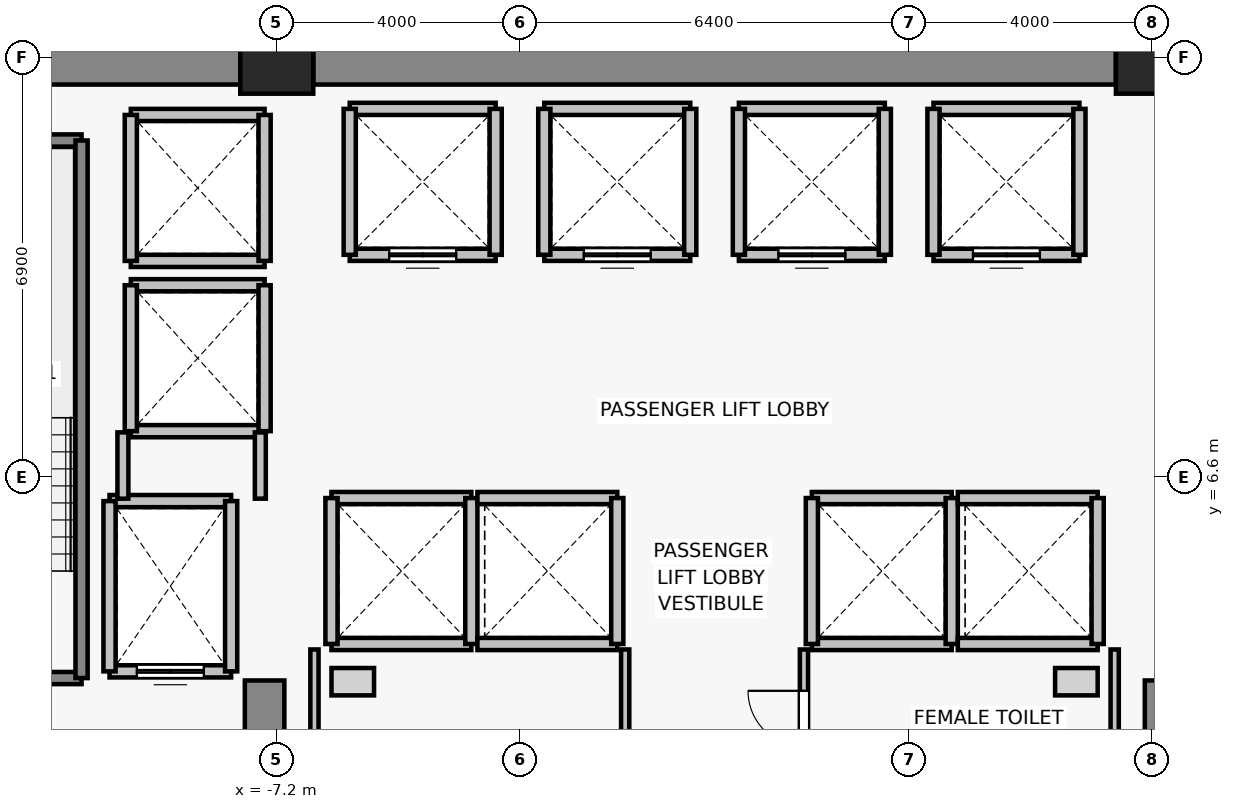
"""IFC4 building model, lengths in metres.
Left out: names, types, materials, properties, quantities, classifications, styles, units other than length and angle.
Written with IfcOpenShell. Run it as: python <this file> out.ifc"""

import sys

from ifc_helpers import new_model, si_unit, direction, frame, frame_2d, origin, origin_2d, place, context, subcontext, project, spatial, rectangle, extrude, source, transform, mapped, element, fill, save


model = new_model("IFC4")
c1 = context("Model", 3, precision=1e-05, world=origin(), true_north=direction((0.0, 1.0)))
c2 = subcontext(c1, "Body", "Model", "MODEL_VIEW")
j1 = project(units=[si_unit("LENGTHUNIT", "METRE"), si_unit("PLANEANGLEUNIT", "RADIAN")], contexts=[c1])
p1 = place(None, origin())
s1 = spatial("IfcSite", under=j1, at=p1, CompositionType="ELEMENT")
p2 = place(p1, origin())
s2 = spatial("IfcBuilding", under=s1, at=p2, CompositionType="ELEMENT")
p3 = place(p2, frame((0.0, 0.0, 40.6)))
s3 = spatial("IfcBuildingStorey", under=s2, at=p3, CompositionType="ELEMENT", Elevation=40.6)
for number, where, z_axis, x_axis in (
    (1, (-7.2, 13.5, 0.0), (0.0, 0.0, 1.0), (1.0, 0.0, 0.0)),
    (2, (7.2, 13.5, 0.0), (0.0, 0.0, 1.0), (1.0, 0.0, 0.0)),
):
    element("IfcColumn", number, at=place(p3, frame(where, z_axis=z_axis, x_axis=x_axis)), inside=s3, PredefinedType="COLUMN", context=c2, shape_type="SweptSolid", body=[
        extrude(rectangle(XDim=1.2, YDim=1.2, at=origin_2d()), origin(), (0.0, 0.0, 1.0), 3.3),
    ])
p4 = place(p3, frame((-13.8, 13.5, 0.0), z_axis=(0.0, 0.0, 1.0), x_axis=(1.0, 0.0, 0.0)))
e3 = element("IfcWall", 3, at=p4, inside=s3, PredefinedType="SHEAR", context=c2, shape_type="SweptSolid", body=[
    extrude(rectangle(XDim=6.0, YDim=0.9, at=frame_2d((3.0, 0.0))), origin(), (0.0, 0.0, 1.0), 3.075),
])
p5 = place(p3, frame((-6.6, 13.5, 0.0), z_axis=(0.0, 0.0, 1.0), x_axis=(1.0, 0.0, 0.0)))
e4 = element("IfcWall", 4, at=p5, inside=s3, PredefinedType="SHEAR", context=c2, shape_type="SweptSolid", body=[
    extrude(rectangle(XDim=13.2, YDim=0.9, at=frame_2d((6.6, 0.0))), origin(), (0.0, 0.0, 1.0), 3.075),
])
for number, where, z_axis, x_axis in (
    (5, (-7.4, -0.75, 0.0), (0.0, 0.0, 1.0), (0.0, 1.0, 0.0)),
    (6, (7.4, -0.75, 0.0), (0.0, 0.0, 1.0), (0.0, 1.0, 0.0)),
):
    element("IfcWall", number, at=place(p3, frame(where, z_axis=z_axis, x_axis=x_axis)), inside=s3, PredefinedType="SHEAR", context=c2, shape_type="SweptSolid", body=[
        extrude(rectangle(XDim=4.0, YDim=0.65, at=frame_2d((2.0, 0.0))), origin(), (0.0, 0.0, 1.0), 3.075),
    ])
p6 = place(p3, frame((-7.95, 3.4, 0.0), z_axis=(0.0, 0.0, 1.0), x_axis=(-1.0, 0.0, 0.0)))
e7 = element("IfcWall", 7, at=p6, inside=s3, PredefinedType="SOLIDWALL", context=c2, shape_type="SweptSolid", body=[
    extrude(rectangle(XDim=2.0, YDim=0.2, at=frame_2d((1.0, 0.0))), origin(), (0.0, 0.0, 1.0), 3.075),
])
p7 = place(p6, frame((0.45, 0.0, 0.0)))
e8 = element("IfcOpeningElement", 8, at=p7, cuts=e7, PredefinedType="OPENING", context=c2, shape_type="SweptSolid", body=[
    extrude(rectangle(XDim=1.1, YDim=2.2, at=frame_2d((0.55, 1.1))), frame((0.0, 0.11, 0.0), z_axis=(0.0, -1.0, 0.0), x_axis=(1.0, 0.0, 0.0)), (0.0, 0.0, 1.0), 0.22),
])
p8 = place(p3, frame((-9.95, 6.2, 0.0), z_axis=(0.0, 0.0, 1.0), x_axis=(1.0, 0.0, 0.0)))
e9 = element("IfcWall", 9, at=p8, inside=s3, PredefinedType="SOLIDWALL", context=c2, shape_type="SweptSolid", body=[
    extrude(rectangle(XDim=2.0, YDim=0.2, at=frame_2d((1.0, 0.0))), origin(), (0.0, 0.0, 1.0), 3.075),
])
for number, where, z_axis, x_axis in (
    (10, (-9.95, 3.4, 0.0), (0.0, 0.0, 1.0), (0.0, 1.0, 0.0)),
    (11, (-7.95, 6.2, 0.0), (0.0, 0.0, 1.0), (0.0, -1.0, 0.0)),
):
    element("IfcWall", number, at=place(p3, frame(where, z_axis=z_axis, x_axis=x_axis)), inside=s3, PredefinedType="SOLIDWALL", context=c2, shape_type="SweptSolid", body=[
        extrude(rectangle(XDim=2.8, YDim=0.2, at=frame_2d((1.4, 0.0))), origin(), (0.0, 0.0, 1.0), 3.075),
    ])
p9 = place(p3, frame((-3.6, 10.25, 0.0), z_axis=(0.0, 0.0, 1.0), x_axis=(-1.0, 0.0, 0.0)))
e12 = element("IfcWall", 12, at=p9, inside=s3, PredefinedType="SOLIDWALL", context=c2, shape_type="SweptSolid", body=[
    extrude(rectangle(XDim=2.4, YDim=0.2, at=frame_2d((1.2, 0.0))), origin(), (0.0, 0.0, 1.0), 3.075),
])
p10 = place(p9, frame((0.65, 0.0, 0.0)))
e13 = element("IfcOpeningElement", 13, at=p10, cuts=e12, PredefinedType="OPENING", context=c2, shape_type="SweptSolid", body=[
    extrude(rectangle(XDim=1.1, YDim=2.2, at=frame_2d((0.55, 1.1))), frame((0.0, 0.11, 0.0), z_axis=(0.0, -1.0, 0.0), x_axis=(1.0, 0.0, 0.0)), (0.0, 0.0, 1.0), 0.22),
])
for number, where, z_axis, x_axis in (
    (14, (-6.0, 12.65, 0.0), (0.0, 0.0, 1.0), (1.0, 0.0, 0.0)),
    (15, (-6.0, 10.25, 0.0), (0.0, 0.0, 1.0), (0.0, 1.0, 0.0)),
    (16, (-3.6, 12.65, 0.0), (0.0, 0.0, 1.0), (0.0, -1.0, 0.0)),
):
    element("IfcWall", number, at=place(p3, frame(where, z_axis=z_axis, x_axis=x_axis)), inside=s3, PredefinedType="SOLIDWALL", context=c2, shape_type="SweptSolid", body=[
        extrude(rectangle(XDim=2.4, YDim=0.2, at=frame_2d((1.2, 0.0))), origin(), (0.0, 0.0, 1.0), 3.075),
    ])
p11 = place(p3, frame((-0.4, 10.25, 0.0), z_axis=(0.0, 0.0, 1.0), x_axis=(-1.0, 0.0, 0.0)))
e17 = element("IfcWall", 17, at=p11, inside=s3, PredefinedType="SOLIDWALL", context=c2, shape_type="SweptSolid", body=[
    extrude(rectangle(XDim=2.4, YDim=0.2, at=frame_2d((1.2, 0.0))), origin(), (0.0, 0.0, 1.0), 3.075),
])
p12 = place(p11, frame((0.65, 0.0, 0.0)))
e18 = element("IfcOpeningElement", 18, at=p12, cuts=e17, PredefinedType="OPENING", context=c2, shape_type="SweptSolid", body=[
    extrude(rectangle(XDim=1.1, YDim=2.2, at=frame_2d((0.55, 1.1))), frame((0.0, 0.11, 0.0), z_axis=(0.0, -1.0, 0.0), x_axis=(1.0, 0.0, 0.0)), (0.0, 0.0, 1.0), 0.22),
])
p13 = place(p3, frame((-2.8, 12.65, 0.0), z_axis=(0.0, 0.0, 1.0), x_axis=(1.0, 0.0, 0.0)))
e19 = element("IfcWall", 19, at=p13, inside=s3, PredefinedType="SOLIDWALL", context=c2, shape_type="SweptSolid", body=[
    extrude(rectangle(XDim=2.4, YDim=0.2, at=frame_2d((1.2, 0.0))), origin(), (0.0, 0.0, 1.0), 3.075),
])
for number, where, z_axis, x_axis in (
    (20, (-2.8, 10.25, 0.0), (0.0, 0.0, 1.0), (0.0, 1.0, 0.0)),
    (21, (-0.4, 12.65, 0.0), (0.0, 0.0, 1.0), (0.0, -1.0, 0.0)),
):
    element("IfcWall", number, at=place(p3, frame(where, z_axis=z_axis, x_axis=x_axis)), inside=s3, PredefinedType="SOLIDWALL", context=c2, shape_type="SweptSolid", body=[
        extrude(rectangle(XDim=2.4, YDim=0.2, at=frame_2d((1.2, 0.0))), origin(), (0.0, 0.0, 1.0), 3.075),
    ])
p14 = place(p3, frame((2.8, 10.25, 0.0), z_axis=(0.0, 0.0, 1.0), x_axis=(-1.0, 0.0, 0.0)))
e22 = element("IfcWall", 22, at=p14, inside=s3, PredefinedType="SOLIDWALL", context=c2, shape_type="SweptSolid", body=[
    extrude(rectangle(XDim=2.4, YDim=0.2, at=frame_2d((1.2, 0.0))), origin(), (0.0, 0.0, 1.0), 3.075),
])
p15 = place(p14, frame((0.65, 0.0, 0.0)))
e23 = element("IfcOpeningElement", 23, at=p15, cuts=e22, PredefinedType="OPENING", context=c2, shape_type="SweptSolid", body=[
    extrude(rectangle(XDim=1.1, YDim=2.2, at=frame_2d((0.55, 1.1))), frame((0.0, 0.11, 0.0), z_axis=(0.0, -1.0, 0.0), x_axis=(1.0, 0.0, 0.0)), (0.0, 0.0, 1.0), 0.22),
])
p16 = place(p3, frame((0.4, 12.65, 0.0), z_axis=(0.0, 0.0, 1.0), x_axis=(1.0, 0.0, 0.0)))
e24 = element("IfcWall", 24, at=p16, inside=s3, PredefinedType="SOLIDWALL", context=c2, shape_type="SweptSolid", body=[
    extrude(rectangle(XDim=2.4, YDim=0.2, at=frame_2d((1.2, 0.0))), origin(), (0.0, 0.0, 1.0), 3.075),
])
for number, where, z_axis, x_axis in (
    (25, (0.4, 10.25, 0.0), (0.0, 0.0, 1.0), (0.0, 1.0, 0.0)),
    (26, (2.8, 12.65, 0.0), (0.0, 0.0, 1.0), (0.0, -1.0, 0.0)),
):
    element("IfcWall", number, at=place(p3, frame(where, z_axis=z_axis, x_axis=x_axis)), inside=s3, PredefinedType="SOLIDWALL", context=c2, shape_type="SweptSolid", body=[
        extrude(rectangle(XDim=2.4, YDim=0.2, at=frame_2d((1.2, 0.0))), origin(), (0.0, 0.0, 1.0), 3.075),
    ])
p17 = place(p3, frame((6.0, 10.25, 0.0), z_axis=(0.0, 0.0, 1.0), x_axis=(-1.0, 0.0, 0.0)))
e27 = element("IfcWall", 27, at=p17, inside=s3, PredefinedType="SOLIDWALL", context=c2, shape_type="SweptSolid", body=[
    extrude(rectangle(XDim=2.4, YDim=0.2, at=frame_2d((1.2, 0.0))), origin(), (0.0, 0.0, 1.0), 3.075),
])
p18 = place(p17, frame((0.65, 0.0, 0.0)))
e28 = element("IfcOpeningElement", 28, at=p18, cuts=e27, PredefinedType="OPENING", context=c2, shape_type="SweptSolid", body=[
    extrude(rectangle(XDim=1.1, YDim=2.2, at=frame_2d((0.55, 1.1))), frame((0.0, 0.11, 0.0), z_axis=(0.0, -1.0, 0.0), x_axis=(1.0, 0.0, 0.0)), (0.0, 0.0, 1.0), 0.22),
])
for number, where, z_axis, x_axis in (
    (29, (3.6, 12.65, 0.0), (0.0, 0.0, 1.0), (1.0, 0.0, 0.0)),
    (30, (3.6, 10.25, 0.0), (0.0, 0.0, 1.0), (0.0, 1.0, 0.0)),
    (31, (6.0, 12.65, 0.0), (0.0, 0.0, 1.0), (0.0, -1.0, 0.0)),
):
    element("IfcWall", number, at=place(p3, frame(where, z_axis=z_axis, x_axis=x_axis)), inside=s3, PredefinedType="SOLIDWALL", context=c2, shape_type="SweptSolid", body=[
        extrude(rectangle(XDim=2.4, YDim=0.2, at=frame_2d((1.2, 0.0))), origin(), (0.0, 0.0, 1.0), 3.075),
    ])
for number, where, z_axis, x_axis in (
    (32, (-4.0, 3.85, 0.0), (0.0, 0.0, 1.0), (-1.0, 0.0, 0.0)),
    (33, (-6.3, 6.25, 0.0), (0.0, 0.0, 1.0), (1.0, 0.0, 0.0)),
):
    element("IfcWall", number, at=place(p3, frame(where, z_axis=z_axis, x_axis=x_axis)), inside=s3, PredefinedType="SOLIDWALL", context=c2, shape_type="SweptSolid", body=[
        extrude(rectangle(XDim=2.3, YDim=0.2, at=frame_2d((1.15, 0.0))), origin(), (0.0, 0.0, 1.0), 3.075),
    ])
for number, where, z_axis, x_axis in (
    (34, (-6.3, 3.85, 0.0), (0.0, 0.0, 1.0), (0.0, 1.0, 0.0)),
    (35, (-4.0, 6.25, 0.0), (0.0, 0.0, 1.0), (0.0, -1.0, 0.0)),
):
    element("IfcWall", number, at=place(p3, frame(where, z_axis=z_axis, x_axis=x_axis)), inside=s3, PredefinedType="SOLIDWALL", context=c2, shape_type="SweptSolid", body=[
        extrude(rectangle(XDim=2.4, YDim=0.2, at=frame_2d((1.2, 0.0))), origin(), (0.0, 0.0, 1.0), 3.075),
    ])
for number, where, z_axis, x_axis in (
    (36, (-1.6, 3.85, 0.0), (0.0, 0.0, 1.0), (-1.0, 0.0, 0.0)),
    (37, (-3.9, 6.25, 0.0), (0.0, 0.0, 1.0), (1.0, 0.0, 0.0)),
):
    element("IfcWall", number, at=place(p3, frame(where, z_axis=z_axis, x_axis=x_axis)), inside=s3, PredefinedType="SOLIDWALL", context=c2, shape_type="SweptSolid", body=[
        extrude(rectangle(XDim=2.3, YDim=0.2, at=frame_2d((1.15, 0.0))), origin(), (0.0, 0.0, 1.0), 3.075),
    ])
p19 = place(p3, frame((-1.6, 6.25, 0.0), z_axis=(0.0, 0.0, 1.0), x_axis=(0.0, -1.0, 0.0)))
e38 = element("IfcWall", 38, at=p19, inside=s3, PredefinedType="SOLIDWALL", context=c2, shape_type="SweptSolid", body=[
    extrude(rectangle(XDim=2.4, YDim=0.2, at=frame_2d((1.2, 0.0))), origin(), (0.0, 0.0, 1.0), 3.075),
])
for number, where, z_axis, x_axis in (
    (39, (3.9, 3.85, 0.0), (0.0, 0.0, 1.0), (-1.0, 0.0, 0.0)),
    (40, (1.6, 6.25, 0.0), (0.0, 0.0, 1.0), (1.0, 0.0, 0.0)),
):
    element("IfcWall", number, at=place(p3, frame(where, z_axis=z_axis, x_axis=x_axis)), inside=s3, PredefinedType="SOLIDWALL", context=c2, shape_type="SweptSolid", body=[
        extrude(rectangle(XDim=2.3, YDim=0.2, at=frame_2d((1.15, 0.0))), origin(), (0.0, 0.0, 1.0), 3.075),
    ])
for number, where, z_axis, x_axis in (
    (41, (1.6, 3.85, 0.0), (0.0, 0.0, 1.0), (0.0, 1.0, 0.0)),
    (42, (3.9, 6.25, 0.0), (0.0, 0.0, 1.0), (0.0, -1.0, 0.0)),
):
    element("IfcWall", number, at=place(p3, frame(where, z_axis=z_axis, x_axis=x_axis)), inside=s3, PredefinedType="SOLIDWALL", context=c2, shape_type="SweptSolid", body=[
        extrude(rectangle(XDim=2.4, YDim=0.2, at=frame_2d((1.2, 0.0))), origin(), (0.0, 0.0, 1.0), 3.075),
    ])
for number, where, z_axis, x_axis in (
    (43, (6.3, 3.85, 0.0), (0.0, 0.0, 1.0), (-1.0, 0.0, 0.0)),
    (44, (4.0, 6.25, 0.0), (0.0, 0.0, 1.0), (1.0, 0.0, 0.0)),
):
    element("IfcWall", number, at=place(p3, frame(where, z_axis=z_axis, x_axis=x_axis)), inside=s3, PredefinedType="SOLIDWALL", context=c2, shape_type="SweptSolid", body=[
        extrude(rectangle(XDim=2.3, YDim=0.2, at=frame_2d((1.15, 0.0))), origin(), (0.0, 0.0, 1.0), 3.075),
    ])
p20 = place(p3, frame((6.3, 6.25, 0.0), z_axis=(0.0, 0.0, 1.0), x_axis=(0.0, -1.0, 0.0)))
e45 = element("IfcWall", 45, at=p20, inside=s3, PredefinedType="SOLIDWALL", context=c2, shape_type="SweptSolid", body=[
    extrude(rectangle(XDim=2.4, YDim=0.2, at=frame_2d((1.2, 0.0))), origin(), (0.0, 0.0, 1.0), 3.075),
])
for number, where, z_axis, x_axis in (
    (46, (-7.4, 7.35, 0.0), (0.0, 0.0, 1.0), (-1.0, 0.0, 0.0)),
    (47, (-9.6, 9.75, 0.0), (0.0, 0.0, 1.0), (1.0, 0.0, 0.0)),
):
    element("IfcWall", number, at=place(p3, frame(where, z_axis=z_axis, x_axis=x_axis)), inside=s3, PredefinedType="SOLIDWALL", context=c2, shape_type="SweptSolid", body=[
        extrude(rectangle(XDim=2.2, YDim=0.2, at=frame_2d((1.1, 0.0))), origin(), (0.0, 0.0, 1.0), 2.465),
    ])
p21 = place(p3, frame((-9.6, 7.35, 0.0), z_axis=(0.0, 0.0, 1.0), x_axis=(0.0, 1.0, 0.0)))
e48 = element("IfcWall", 48, at=p21, inside=s3, PredefinedType="SOLIDWALL", context=c2, shape_type="SweptSolid", body=[
    extrude(rectangle(XDim=2.4, YDim=0.2, at=frame_2d((1.2, 0.0))), origin(), (0.0, 0.0, 1.0), 3.075),
])
p22 = place(p3, frame((-7.4, 9.75, 0.0), z_axis=(0.0, 0.0, 1.0), x_axis=(0.0, -1.0, 0.0)))
e49 = element("IfcWall", 49, at=p22, inside=s3, PredefinedType="SOLIDWALL", context=c2, shape_type="SweptSolid", body=[
    extrude(rectangle(XDim=2.4, YDim=0.2, at=frame_2d((1.2, 0.0))), origin(), (0.0, 0.0, 1.0), 2.465),
])
for number, where, z_axis, x_axis in (
    (50, (-7.4, 10.15, 0.0), (0.0, 0.0, 1.0), (-1.0, 0.0, 0.0)),
    (51, (-9.6, 12.55, 0.0), (0.0, 0.0, 1.0), (1.0, 0.0, 0.0)),
):
    element("IfcWall", number, at=place(p3, frame(where, z_axis=z_axis, x_axis=x_axis)), inside=s3, PredefinedType="SOLIDWALL", context=c2, shape_type="SweptSolid", body=[
        extrude(rectangle(XDim=2.2, YDim=0.2, at=frame_2d((1.1, 0.0))), origin(), (0.0, 0.0, 1.0), 2.465),
    ])
p23 = place(p3, frame((-9.6, 10.15, 0.0), z_axis=(0.0, 0.0, 1.0), x_axis=(0.0, 1.0, 0.0)))
e52 = element("IfcWall", 52, at=p23, inside=s3, PredefinedType="SOLIDWALL", context=c2, shape_type="SweptSolid", body=[
    extrude(rectangle(XDim=2.4, YDim=0.2, at=frame_2d((1.2, 0.0))), origin(), (0.0, 0.0, 1.0), 3.075),
])
p24 = place(p3, frame((-7.4, 12.55, 0.0), z_axis=(0.0, 0.0, 1.0), x_axis=(0.0, -1.0, 0.0)))
e53 = element("IfcWall", 53, at=p24, inside=s3, PredefinedType="SOLIDWALL", context=c2, shape_type="SweptSolid", body=[
    extrude(rectangle(XDim=2.4, YDim=0.2, at=frame_2d((1.2, 0.0))), origin(), (0.0, 0.0, 1.0), 2.465),
])
p25 = place(p3, frame((-10.41, 3.29, 0.0), z_axis=(0.0, 0.0, 1.0), x_axis=(-1.0, 0.0, 0.0)))
e54 = element("IfcWall", 54, at=p25, inside=s3, PredefinedType="SOLIDWALL", context=c2, shape_type="SweptSolid", body=[
    extrude(rectangle(XDim=3.52, YDim=0.2, at=frame_2d((1.76, 0.0))), origin(), (0.0, 0.0, 1.0), 3.075),
])
p26 = place(p25, frame((1.165, 0.0, 0.0)))
e55 = element("IfcOpeningElement", 55, at=p26, cuts=e54, PredefinedType="OPENING", context=c2, shape_type="SweptSolid", body=[
    extrude(rectangle(XDim=1.15, YDim=2.15, at=frame_2d((0.575, 1.075))), frame((0.0, 0.11, 0.0), z_axis=(0.0, -1.0, 0.0), x_axis=(1.0, 0.0, 0.0)), (0.0, 0.0, 1.0), 0.22),
])
p27 = place(p3, frame((-13.93, 12.13, 0.0), z_axis=(0.0, 0.0, 1.0), x_axis=(1.0, 0.0, 0.0)))
e56 = element("IfcWall", 56, at=p27, inside=s3, PredefinedType="SOLIDWALL", context=c2, shape_type="SweptSolid", body=[
    extrude(rectangle(XDim=3.52, YDim=0.2, at=frame_2d((1.76, 0.0))), origin(), (0.0, 0.0, 1.0), 3.075),
])
p28 = place(p3, frame((-10.41, 12.13, 0.0), z_axis=(0.0, 0.0, 1.0), x_axis=(0.0, -1.0, 0.0)))
e57 = element("IfcWall", 57, at=p28, inside=s3, PredefinedType="SOLIDWALL", context=c2, shape_type="SweptSolid", body=[
    extrude(rectangle(XDim=8.84, YDim=0.2, at=frame_2d((4.42, 0.0))), origin(), (0.0, 0.0, 1.0), 3.075),
])
p29 = place(p3, frame((-9.73, 6.24, 0.0), z_axis=(0.0, 0.0, 1.0), x_axis=(0.0, 1.0, 0.0)))
e58 = element("IfcWall", 58, at=p29, inside=s3, PredefinedType="PARTITIONING", context=c2, shape_type="SweptSolid", body=[
    extrude(rectangle(XDim=1.09, YDim=0.18, at=frame_2d((0.545, 0.0))), origin(), (0.0, 0.0, 1.0), 3.075),
])
p30 = place(p3, frame((-7.47, 7.33, 0.0), z_axis=(0.0, 0.0, 1.0), x_axis=(0.0, -1.0, 0.0)))
e59 = element("IfcWall", 59, at=p30, inside=s3, PredefinedType="PARTITIONING", context=c2, shape_type="SweptSolid", body=[
    extrude(rectangle(XDim=1.09, YDim=0.18, at=frame_2d((0.545, 0.0))), origin(), (0.0, 0.0, 1.0), 2.465),
])
p31 = place(p3, frame((-6.58, -0.73, 0.0), z_axis=(0.0, 0.0, 1.0), x_axis=(0.0, 1.0, 0.0)))
e60 = element("IfcWall", 60, at=p31, inside=s3, PredefinedType="PARTITIONING", context=c2, shape_type="SweptSolid", body=[
    extrude(rectangle(XDim=4.49, YDim=0.135, at=frame_2d((2.245, 0.0))), origin(), (0.0, 0.0, 1.0), 3.075),
])
p32 = place(p3, frame((-1.47, 3.76, 0.0), z_axis=(0.0, 0.0, 1.0), x_axis=(0.0, -1.0, 0.0)))
e61 = element("IfcWall", 61, at=p32, inside=s3, PredefinedType="PARTITIONING", context=c2, shape_type="SweptSolid", body=[
    extrude(rectangle(XDim=4.49, YDim=0.135, at=frame_2d((2.245, 0.0))), origin(), (0.0, 0.0, 1.0), 3.075),
])
p33 = place(p32, frame((1.8, 0.0, 0.0)))
e62 = element("IfcOpeningElement", 62, at=p33, cuts=e61, PredefinedType="OPENING", context=c2, shape_type="SweptSolid", body=[
    extrude(rectangle(XDim=0.92, YDim=2.1, at=frame_2d((0.46, 1.05))), frame((0.0, 0.077, 0.0), z_axis=(0.0, -1.0, 0.0), x_axis=(1.0, 0.0, 0.0)), (0.0, 0.0, 1.0), 0.155),
])
p34 = place(p3, frame((1.47, 1.48, 0.0), z_axis=(0.0, 0.0, 1.0), x_axis=(0.0, 1.0, 0.0)))
e63 = element("IfcWall", 63, at=p34, inside=s3, PredefinedType="PARTITIONING", context=c2, shape_type="SweptSolid", body=[
    extrude(rectangle(XDim=2.28, YDim=0.135, at=frame_2d((1.14, 0.0))), origin(), (0.0, 0.0, 1.0), 3.075),
])
p35 = place(p34, frame((0.68, 0.0, 0.0)))
e64 = element("IfcOpeningElement", 64, at=p35, cuts=e63, PredefinedType="OPENING", context=c2, shape_type="SweptSolid", body=[
    extrude(rectangle(XDim=0.92, YDim=2.1, at=frame_2d((0.46, 1.05))), frame((0.0, 0.077, 0.0), z_axis=(0.0, -1.0, 0.0), x_axis=(1.0, 0.0, 0.0)), (0.0, 0.0, 1.0), 0.155),
])
p36 = place(p3, frame((6.58, 3.76, 0.0), z_axis=(0.0, 0.0, 1.0), x_axis=(0.0, -1.0, 0.0)))
e65 = element("IfcWall", 65, at=p36, inside=s3, PredefinedType="PARTITIONING", context=c2, shape_type="SweptSolid", body=[
    extrude(rectangle(XDim=2.28, YDim=0.135, at=frame_2d((1.14, 0.0))), origin(), (0.0, 0.0, 1.0), 3.075),
])
m1 = source(origin(), c2, "Body", "SweptSolid", [
    extrude(rectangle(XDim=1.1, YDim=2.2, at=frame_2d((0.55, 1.1))), frame((0.0, 0.025, 0.0), z_axis=(0.0, -1.0, 0.0), x_axis=(1.0, 0.0, 0.0)), (0.0, 0.0, 1.0), 0.05),
])
p37 = place(p7, origin())
e66 = element("IfcDoor", 66, at=p37, inside=s3, OperationType="DOUBLE_DOOR_SLIDING", PredefinedType="DOOR", context=c2, shape_type="MappedRepresentation", body=[
    mapped(m1, transform((0.0, 0.0, 0.0), x_axis=(1.0, 0.0, 0.0), y_axis=(0.0, 1.0, 0.0), z_axis=(0.0, 0.0, 1.0), scale=1.0)),
])
fill(e8, e66)
p38 = place(p10, origin())
e67 = element("IfcDoor", 67, at=p38, inside=s3, OperationType="DOUBLE_DOOR_SLIDING", PredefinedType="DOOR", context=c2, shape_type="MappedRepresentation", body=[
    mapped(m1, transform((0.0, 0.0, 0.0), x_axis=(1.0, 0.0, 0.0), y_axis=(0.0, 1.0, 0.0), z_axis=(0.0, 0.0, 1.0), scale=1.0)),
])
fill(e13, e67)
p39 = place(p12, origin())
e68 = element("IfcDoor", 68, at=p39, inside=s3, OperationType="DOUBLE_DOOR_SLIDING", PredefinedType="DOOR", context=c2, shape_type="MappedRepresentation", body=[
    mapped(m1, transform((0.0, 0.0, 0.0), x_axis=(1.0, 0.0, 0.0), y_axis=(0.0, 1.0, 0.0), z_axis=(0.0, 0.0, 1.0), scale=1.0)),
])
fill(e18, e68)
p40 = place(p15, origin())
e69 = element("IfcDoor", 69, at=p40, inside=s3, OperationType="DOUBLE_DOOR_SLIDING", PredefinedType="DOOR", context=c2, shape_type="MappedRepresentation", body=[
    mapped(m1, transform((0.0, 0.0, 0.0), x_axis=(1.0, 0.0, 0.0), y_axis=(0.0, 1.0, 0.0), z_axis=(0.0, 0.0, 1.0), scale=1.0)),
])
fill(e23, e69)
p41 = place(p18, origin())
e70 = element("IfcDoor", 70, at=p41, inside=s3, OperationType="DOUBLE_DOOR_SLIDING", PredefinedType="DOOR", context=c2, shape_type="MappedRepresentation", body=[
    mapped(m1, transform((0.0, 0.0, 0.0), x_axis=(1.0, 0.0, 0.0), y_axis=(0.0, 1.0, 0.0), z_axis=(0.0, 0.0, 1.0), scale=1.0)),
])
fill(e28, e70)
m2 = source(origin(), c2, "Body", "SweptSolid", [
    extrude(rectangle(XDim=0.92, YDim=2.1, at=frame_2d((0.46, 1.05))), frame((0.0, 0.025, 0.0), z_axis=(0.0, -1.0, 0.0), x_axis=(1.0, 0.0, 0.0)), (0.0, 0.0, 1.0), 0.05),
])
p42 = place(p35, origin())
e71 = element("IfcDoor", 71, at=p42, inside=s3, OperationType="SINGLE_SWING_RIGHT", PredefinedType="DOOR", context=c2, shape_type="MappedRepresentation", body=[
    mapped(m2, transform((0.0, 0.0, 0.0), x_axis=(1.0, 0.0, 0.0), y_axis=(0.0, 1.0, 0.0), z_axis=(0.0, 0.0, 1.0), scale=1.0)),
])
fill(e64, e71)
save(model, sys.argv[1])
